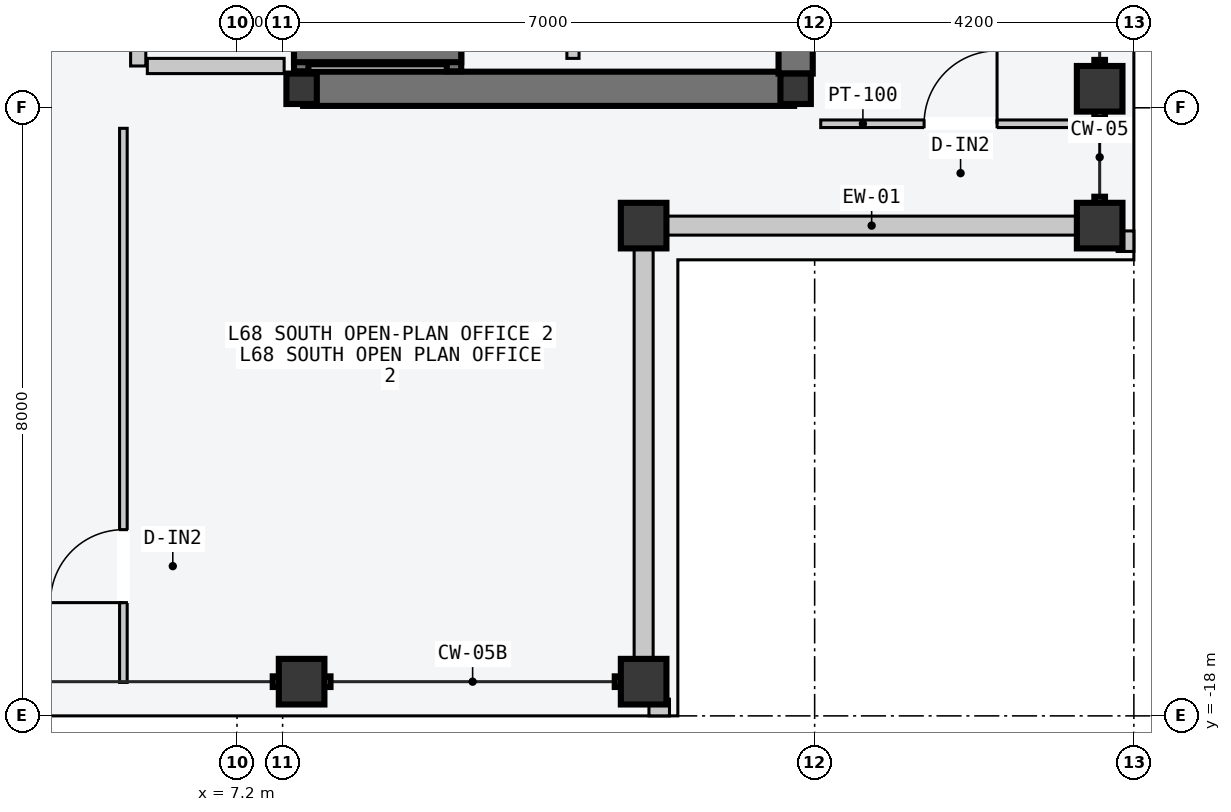
"""IFC4 building model, lengths in metres.
Left out: names, types, materials, properties, quantities, classifications, styles, units other than length and angle.
Written with IfcOpenShell. Run it as: python <this file> out.ifc"""

import sys

from ifc_helpers import new_model, si_unit, direction, frame, frame_2d, origin, origin_2d, place, context, subcontext, project, spatial, rectangle, hollow_rectangle, i_section, extrude, element, fill, save


model = new_model("IFC4")
c1 = context("Model", 3, precision=1e-05, world=origin(), true_north=direction((0.0, 1.0)))
c2 = subcontext(c1, "Body", "Model", "MODEL_VIEW")
j1 = project(units=[si_unit("LENGTHUNIT", "METRE"), si_unit("PLANEANGLEUNIT", "RADIAN")], contexts=[c1])
p1 = place(None, origin())
s1 = spatial("IfcSite", under=j1, at=p1, CompositionType="ELEMENT")
p2 = place(p1, origin())
s2 = spatial("IfcBuilding", under=s1, at=p2, CompositionType="ELEMENT")
p3 = place(p2, frame((0.0, 0.0, 258.0)))
s3 = spatial("IfcBuildingStorey", under=s2, at=p3, CompositionType="ELEMENT", Elevation=258.0)
p4 = place(p3, frame((8.07, -9.75, -0.2), z_axis=(0.0, 0.0, 1.0), x_axis=(1.0, 0.0, 0.0)))
e1 = element("IfcWall", 1, at=p4, inside=s3, PredefinedType="SHEAR", context=c2, shape_type="SweptSolid", body=[
    extrude(rectangle(XDim=6.46, YDim=0.45, at=frame_2d((3.23, 0.0))), origin(), (0.0, 0.0, 1.0), 3.6),
])
p5 = place(p3, frame((14.55, -9.55, -0.2), z_axis=(0.0, 0.0, 1.0), x_axis=(0.0, 1.0, 0.0)))
e2 = element("IfcWall", 2, at=p5, inside=s3, PredefinedType="SHEAR", context=c2, shape_type="SweptSolid", body=[
    extrude(rectangle(XDim=9.35, YDim=0.45, at=frame_2d((4.675, 0.0))), origin(), (0.0, 0.0, 1.0), 3.6),
])
for number, where, z_axis, x_axis in (
    (3, (8.05, -9.75, 0.0), (0.0, 0.0, 1.0), (1.0, 0.0, 0.0)),
    (4, (14.55, -9.75, 0.0), (0.0, 0.0, 1.0), (1.0, 0.0, 0.0)),
):
    element("IfcColumn", number, at=place(p3, frame(where, z_axis=z_axis, x_axis=x_axis)), inside=s3, PredefinedType="COLUMN", context=c2, shape_type="SweptSolid", body=[
        extrude(i_section(OverallWidth=0.4, OverallDepth=0.4, WebThickness=0.013, FlangeThickness=0.021, at=origin_2d()), origin(), (0.0, 0.0, 1.0), 3.6),
    ])
for number, where, z_axis, x_axis in (
    (5, (8.05, -17.55, 0.0), (0.0, 0.0, 1.0), (1.0, 0.0, 0.0)),
    (6, (12.55, -17.55, 0.0), (0.0, 0.0, 1.0), (1.0, 0.0, 0.0)),
    (7, (18.55, -11.55, 0.0), (0.0, 0.0, 1.0), (0.0, 1.0, 0.0)),
    (8, (18.55, -9.75, 0.0), (0.0, 0.0, 1.0), (0.0, 1.0, 0.0)),
    (9, (12.55, -11.55, 0.0), (0.0, 0.0, 1.0), (1.0, 0.0, 0.0)),
):
    element("IfcColumn", number, at=place(p3, frame(where, z_axis=z_axis, x_axis=x_axis)), inside=s3, PredefinedType="COLUMN", context=c2, shape_type="SweptSolid", body=[
        extrude(hollow_rectangle(XDim=0.6, YDim=0.6, WallThickness=0.025, at=origin_2d()), origin(), (0.0, 0.0, 1.0), 3.6),
    ])
for number, where, z_axis, x_axis in (
    (10, (12.86, -11.55, 0.0), (0.0, 0.0, 1.0), (1.0, 0.0, 0.0)),
    (11, (12.55, -17.24, 0.0), (0.0, 0.0, 1.0), (0.0, 1.0, 0.0)),
):
    element("IfcWall", number, at=place(p3, frame(where, z_axis=z_axis, x_axis=x_axis)), inside=s3, PredefinedType="STANDARD", context=c2, shape_type="SweptSolid", body=[
        extrude(rectangle(XDim=5.38, YDim=0.25, at=frame_2d((2.69, 0.0))), origin(), (0.0, 0.0, 1.0), 2.85),
    ])
for number, where, z_axis, x_axis in (
    (12, (12.62, -17.89, 0.0), (0.0, 0.0, 1.0), (1.0, 0.0, 0.0)),
    (13, (18.89, -11.89, 0.0), (0.0, 0.0, 1.0), (0.0, 1.0, 0.0)),
):
    element("IfcWall", number, at=place(p3, frame(where, z_axis=z_axis, x_axis=x_axis)), inside=s3, PredefinedType="PARAPET", context=c2, shape_type="SweptSolid", body=[
        extrude(rectangle(XDim=0.27, YDim=0.22, at=frame_2d((0.135, 0.0))), origin(), (0.0, 0.0, 1.0), 1.2),
    ])
p6 = place(p3, frame((8.045, -9.52, -0.2), z_axis=(0.0, 0.0, 1.0), x_axis=(0.0, 1.0, 0.0)))
e14 = element("IfcWall", 14, at=p6, inside=s3, PredefinedType="SOLIDWALL", context=c2, shape_type="SweptSolid", body=[
    extrude(rectangle(XDim=2.12, YDim=0.19, at=frame_2d((1.06, 0.0))), origin(), (0.0, 0.0, 1.0), 3.6),
])
p7 = place(p6, frame((0.57, 0.0, 0.2)))
e15 = element("IfcOpeningElement", 15, at=p7, cuts=e14, PredefinedType="OPENING", context=c2, shape_type="SweptSolid", body=[
    extrude(rectangle(XDim=1.1, YDim=2.2, at=frame_2d((0.55, 1.1))), frame((0.0, 0.105, 0.0), z_axis=(0.0, -1.0, 0.0), x_axis=(1.0, 0.0, 0.0)), (0.0, 0.0, 1.0), 0.21),
])
p8 = place(p3, frame((10.055, -9.52, -0.2), z_axis=(0.0, 0.0, 1.0), x_axis=(0.0, 1.0, 0.0)))
e16 = element("IfcWall", 16, at=p8, inside=s3, PredefinedType="SOLIDWALL", context=c2, shape_type="SweptSolid", body=[
    extrude(rectangle(XDim=2.12, YDim=0.19, at=frame_2d((1.06, 0.0))), origin(), (0.0, 0.0, 1.0), 3.6),
])
p9 = place(p3, frame((7.95, -9.305, -0.2), z_axis=(0.0, 0.0, 1.0), x_axis=(1.0, 0.0, 0.0)))
e17 = element("IfcWall", 17, at=p9, inside=s3, PredefinedType="SOLIDWALL", context=c2, shape_type="SweptSolid", body=[
    extrude(rectangle(XDim=2.2, YDim=0.19, at=frame_2d((1.1, 0.0))), origin(), (0.0, 0.0, 1.0), 3.6),
])
p10 = place(p3, frame((5.9, -9.45, 0.0), z_axis=(0.0, 0.0, 1.0), x_axis=(0.0, 1.0, 0.0)))
e18 = element("IfcWall", 18, at=p10, inside=s3, PredefinedType="PARTITIONING", context=c2, shape_type="SweptSolid", body=[
    extrude(rectangle(XDim=10.5, YDim=0.2, at=frame_2d((5.25, 0.0))), origin(), (0.0, 0.0, 1.0), 3.4),
])
p11 = place(p10, frame((3.9, 0.0, 0.0)))
e19 = element("IfcOpeningElement", 19, at=p11, cuts=e18, PredefinedType="OPENING", context=c2, shape_type="SweptSolid", body=[
    extrude(rectangle(XDim=1.5, YDim=2.2, at=frame_2d((0.75, 1.1))), frame((0.0, 0.11, 0.0), z_axis=(0.0, -1.0, 0.0), x_axis=(1.0, 0.0, 0.0)), (0.0, 0.0, 1.0), 0.22),
])
p12 = place(p3, frame((6.02, -9.45, 0.0), z_axis=(0.0, 0.0, 1.0), x_axis=(1.0, 0.0, 0.0)))
e20 = element("IfcWall", 20, at=p12, inside=s3, PredefinedType="PARTITIONING", context=c2, shape_type="SweptSolid", body=[
    extrude(rectangle(XDim=1.8, YDim=0.2, at=frame_2d((0.9, 0.0))), origin(), (0.0, 0.0, 1.0), 3.4),
])
p13 = place(p3, frame((11.62, -9.35, 0.0), z_axis=(0.0, 0.0, 1.0), x_axis=(0.0, 1.0, 0.0)))
e21 = element("IfcWall", 21, at=p13, inside=s3, PredefinedType="PARTITIONING", context=c2, shape_type="SweptSolid", body=[
    extrude(rectangle(XDim=3.85, YDim=0.16, at=frame_2d((1.925, 0.0))), origin(), (0.0, 0.0, 1.0), 3.4),
])
p14 = place(p13, frame((0.512, 0.0, 0.0)))
e22 = element("IfcOpeningElement", 22, at=p14, cuts=e21, PredefinedType="OPENING", context=c2, shape_type="SweptSolid", body=[
    extrude(rectangle(XDim=0.9, YDim=2.15, at=frame_2d((0.45, 1.075))), frame((0.0, 0.09, 0.0), z_axis=(0.0, -1.0, 0.0), x_axis=(1.0, 0.0, 0.0)), (0.0, 0.0, 1.0), 0.18),
])
p15 = place(p13, frame((2.438, 0.0, 0.0)))
e23 = element("IfcOpeningElement", 23, at=p15, cuts=e21, PredefinedType="OPENING", context=c2, shape_type="SweptSolid", body=[
    extrude(rectangle(XDim=0.9, YDim=2.15, at=frame_2d((0.45, 1.075))), frame((0.0, 0.09, 0.0), z_axis=(0.0, -1.0, 0.0), x_axis=(1.0, 0.0, 0.0)), (0.0, 0.0, 1.0), 0.18),
])
p16 = place(p3, frame((5.705, -17.56, 0.0), z_axis=(0.0, 0.0, 1.0), x_axis=(0.0, 1.0, 0.0)))
e24 = element("IfcWall", 24, at=p16, inside=s3, PredefinedType="PARTITIONING", context=c2, shape_type="SweptSolid", body=[
    extrude(rectangle(XDim=7.29, YDim=0.1, at=frame_2d((3.645, 0.0))), origin(), (0.0, 0.0, 1.0), 3.4),
])
p17 = place(p16, frame((1.05, 0.0, 0.0)))
e25 = element("IfcOpeningElement", 25, at=p17, cuts=e24, PredefinedType="OPENING", context=c2, shape_type="SweptSolid", body=[
    extrude(rectangle(XDim=0.96, YDim=2.18, at=frame_2d((0.48, 1.09))), frame((0.0, 0.06, 0.0), z_axis=(0.0, -1.0, 0.0), x_axis=(1.0, 0.0, 0.0)), (0.0, 0.0, 1.0), 0.12),
])
p18 = place(p3, frame((14.88, -10.21, 0.0), z_axis=(0.0, 0.0, 1.0), x_axis=(1.0, 0.0, 0.0)))
e26 = element("IfcWall", 26, at=p18, inside=s3, PredefinedType="PARTITIONING", context=c2, shape_type="SweptSolid", body=[
    extrude(rectangle(XDim=3.68, YDim=0.1, at=frame_2d((1.84, 0.0))), origin(), (0.0, 0.0, 1.0), 3.4),
])
p19 = place(p18, frame((1.36, 0.0, 0.0)))
e27 = element("IfcOpeningElement", 27, at=p19, cuts=e26, PredefinedType="OPENING", context=c2, shape_type="SweptSolid", body=[
    extrude(rectangle(XDim=0.96, YDim=2.18, at=frame_2d((0.48, 1.09))), frame((0.0, 0.06, 0.0), z_axis=(0.0, -1.0, 0.0), x_axis=(1.0, 0.0, 0.0)), (0.0, 0.0, 1.0), 0.12),
])
p20 = place(p17, origin())
e28 = element("IfcDoor", 28, at=p20, inside=s3, OperationType="SINGLE_SWING_LEFT", PredefinedType="DOOR", context=c2, shape_type="SweptSolid", body=[
    extrude(rectangle(XDim=0.96, YDim=2.18, at=frame_2d((0.48, 1.09))), frame((0.0, 0.025, 0.0), z_axis=(0.0, -1.0, 0.0), x_axis=(1.0, 0.0, 0.0)), (0.0, 0.0, 1.0), 0.05),
])
fill(e25, e28)
p21 = place(p19, origin())
e29 = element("IfcDoor", 29, at=p21, inside=s3, OperationType="SINGLE_SWING_RIGHT", PredefinedType="DOOR", context=c2, shape_type="SweptSolid", body=[
    extrude(rectangle(XDim=0.96, YDim=2.18, at=frame_2d((0.48, 1.09))), frame((0.0, 0.025, 0.0), z_axis=(0.0, -1.0, 0.0), x_axis=(1.0, 0.0, 0.0)), (0.0, 0.0, 1.0), 0.05),
])
fill(e27, e29)
save(model, sys.argv[1])
